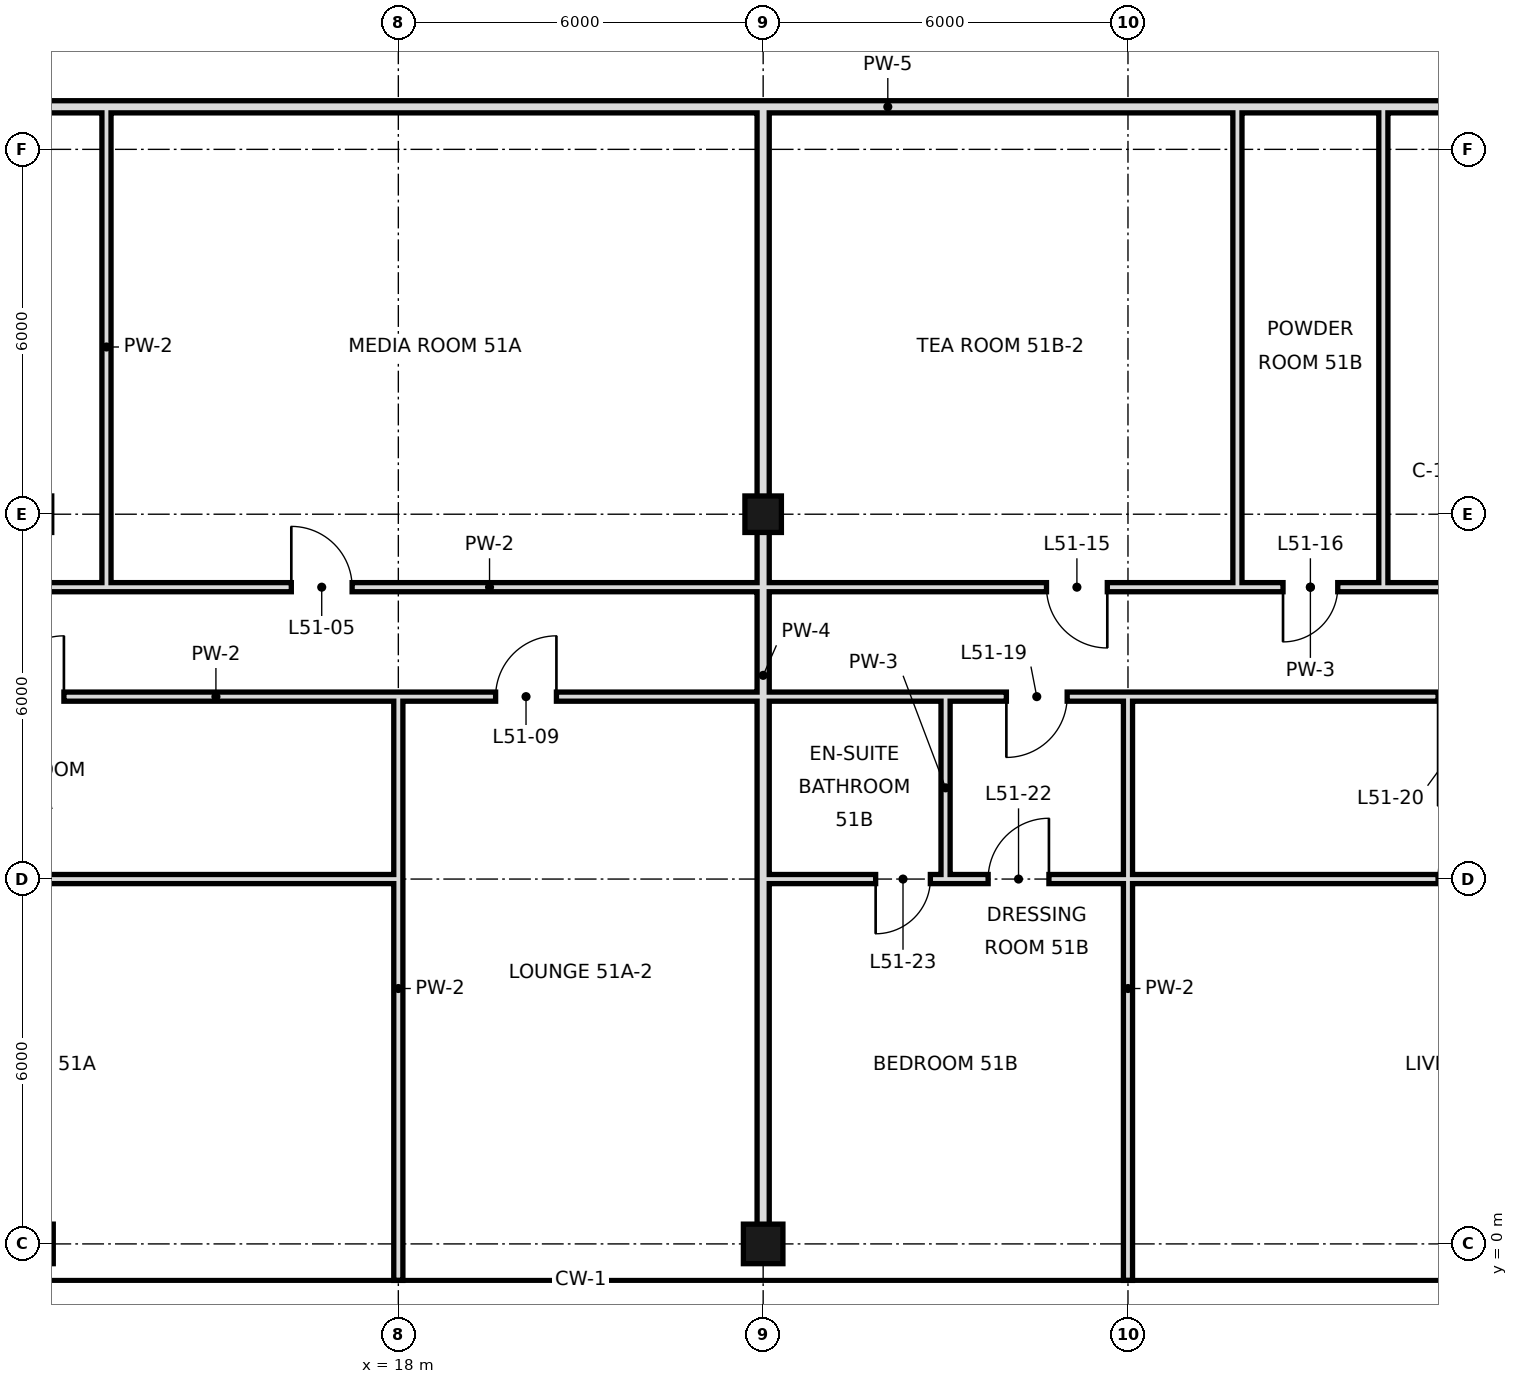
"""IFC4 building model, lengths in metres.
Left out: names, types, materials, properties, quantities, classifications, styles, units other than length and angle.
Written with IfcOpenShell. Run it as: python <this file> out.ifc"""

import sys

from ifc_helpers import new_model, si_unit, direction, frame, frame_2d, origin, origin_2d, place, context, subcontext, project, spatial, rectangle, hollow_rectangle, extrude, element, fill, save


model = new_model("IFC4")
c1 = context("Model", 3, precision=1e-05, world=origin(), true_north=direction((0.0, 1.0)))
c2 = subcontext(c1, "Body", "Model", "MODEL_VIEW")
j1 = project(units=[si_unit("LENGTHUNIT", "METRE"), si_unit("PLANEANGLEUNIT", "RADIAN")], contexts=[c1])
p1 = place(None, origin())
s1 = spatial("IfcSite", under=j1, at=p1, CompositionType="ELEMENT")
p2 = place(p1, origin())
s2 = spatial("IfcBuilding", under=s1, at=p2, CompositionType="ELEMENT")
p3 = place(p2, frame((0.0, 0.0, 219.0)))
s3 = spatial("IfcBuildingStorey", under=s2, at=p3, CompositionType="ELEMENT", Elevation=219.0)
for number, where, z_axis, x_axis in (
    (1, (12.0, 0.0, 0.0), (0.0, 0.0, 1.0), (1.0, 0.0, 0.0)),
    (2, (24.0, 0.0, 0.0), (0.0, 0.0, 1.0), (1.0, 0.0, 0.0)),
):
    element("IfcColumn", number, at=place(p3, frame(where, z_axis=z_axis, x_axis=x_axis)), inside=s3, PredefinedType="COLUMN", context=c2, shape_type="SweptSolid", body=[
        extrude(hollow_rectangle(XDim=0.65, YDim=0.65, WallThickness=0.032, at=origin_2d()), origin(), (0.0, 0.0, 1.0), 3.6),
    ])
p4 = place(p3, frame((24.0, 12.0, 0.0), z_axis=(0.0, 0.0, 1.0), x_axis=(1.0, 0.0, 0.0)))
e3 = element("IfcColumn", 3, at=p4, inside=s3, PredefinedType="COLUMN", context=c2, shape_type="SweptSolid", body=[
    extrude(hollow_rectangle(XDim=0.6, YDim=0.6, WallThickness=0.028, at=origin_2d()), origin(), (0.0, 0.0, 1.0), 3.6),
])
p5 = place(p3, frame((13.2, 10.8, 0.0), z_axis=(0.0, 0.0, 1.0), x_axis=(0.0, 1.0, 0.0)))
e4 = element("IfcWall", 4, at=p5, inside=s3, PredefinedType="PARTITIONING", context=c2, shape_type="SweptSolid", body=[
    extrude(rectangle(XDim=7.9, YDim=0.15, at=frame_2d((3.95, 0.0))), origin(), (0.0, 0.0, 1.0), 3.42),
])
p6 = place(p3, frame((18.0, -0.6, 0.0), z_axis=(0.0, 0.0, 1.0), x_axis=(0.0, 1.0, 0.0)))
e5 = element("IfcWall", 5, at=p6, inside=s3, PredefinedType="PARTITIONING", context=c2, shape_type="SweptSolid", body=[
    extrude(rectangle(XDim=9.6, YDim=0.15, at=frame_2d((4.8, 0.0))), origin(), (0.0, 0.0, 1.0), 2.72),
])
p7 = place(p3, frame((24.0, 0.0, 0.0), z_axis=(0.0, 0.0, 1.0), x_axis=(0.0, 1.0, 0.0)))
e6 = element("IfcWall", 6, at=p7, inside=s3, PredefinedType="SOLIDWALL", context=c2, shape_type="SweptSolid", body=[
    extrude(rectangle(XDim=18.7, YDim=0.2, at=frame_2d((9.35, 0.0))), origin(), (0.0, 0.0, 1.0), 2.72),
])
p8 = place(p3, frame((27.0, 6.0, 0.0), z_axis=(0.0, 0.0, 1.0), x_axis=(0.0, 1.0, 0.0)))
e7 = element("IfcWall", 7, at=p8, inside=s3, PredefinedType="PARTITIONING", context=c2, shape_type="SweptSolid", body=[
    extrude(rectangle(XDim=3.0, YDim=0.15, at=frame_2d((1.5, 0.0))), origin(), (0.0, 0.0, 1.0), 3.42),
])
p9 = place(p3, frame((30.0, -0.6, 0.0), z_axis=(0.0, 0.0, 1.0), x_axis=(0.0, 1.0, 0.0)))
e8 = element("IfcWall", 8, at=p9, inside=s3, PredefinedType="PARTITIONING", context=c2, shape_type="SweptSolid", body=[
    extrude(rectangle(XDim=9.6, YDim=0.15, at=frame_2d((4.8, 0.0))), origin(), (0.0, 0.0, 1.0), 2.72),
])
for number, where, z_axis, x_axis in (
    (9, (31.8, 10.8, 0.0), (0.0, 0.0, 1.0), (0.0, 1.0, 0.0)),
    (10, (34.2, 10.8, 0.0), (0.0, 0.0, 1.0), (0.0, 1.0, 0.0)),
):
    element("IfcWall", number, at=place(p3, frame(where, z_axis=z_axis, x_axis=x_axis)), inside=s3, PredefinedType="PARTITIONING", context=c2, shape_type="SweptSolid", body=[
        extrude(rectangle(XDim=7.9, YDim=0.15, at=frame_2d((3.95, 0.0))), origin(), (0.0, 0.0, 1.0), 3.42),
    ])
p10 = place(p3, frame((7.2, 10.8, 0.0), z_axis=(0.0, 0.0, 1.0), x_axis=(1.0, 0.0, 0.0)))
e11 = element("IfcWall", 11, at=p10, inside=s3, PredefinedType="PARTITIONING", context=c2, shape_type="SweptSolid", body=[
    extrude(rectangle(XDim=24.6, YDim=0.15, at=frame_2d((12.3, 0.0))), origin(), (0.0, 0.0, 1.0), 3.42),
])
p11 = place(p10, frame((1.6, 0.0, 0.0)))
e12 = element("IfcOpeningElement", 12, at=p11, cuts=e11, PredefinedType="OPENING", context=c2, shape_type="SweptSolid", body=[
    extrude(rectangle(XDim=1.0, YDim=2.4, at=frame_2d((0.5, 1.2))), frame((0.0, 0.085, 0.0), z_axis=(0.0, -1.0, 0.0), x_axis=(1.0, 0.0, 0.0)), (0.0, 0.0, 1.0), 0.17),
])
p12 = place(p10, frame((9.04, 0.0, 0.0)))
e13 = element("IfcOpeningElement", 13, at=p12, cuts=e11, PredefinedType="OPENING", context=c2, shape_type="SweptSolid", body=[
    extrude(rectangle(XDim=1.0, YDim=2.4, at=frame_2d((0.5, 1.2))), frame((0.0, 0.085, 0.0), z_axis=(0.0, -1.0, 0.0), x_axis=(1.0, 0.0, 0.0)), (0.0, 0.0, 1.0), 0.17),
])
p13 = place(p10, frame((21.46, 0.0, 0.0)))
e14 = element("IfcOpeningElement", 14, at=p13, cuts=e11, PredefinedType="OPENING", context=c2, shape_type="SweptSolid", body=[
    extrude(rectangle(XDim=1.0, YDim=2.4, at=frame_2d((0.5, 1.2))), frame((0.0, 0.085, 0.0), z_axis=(0.0, -1.0, 0.0), x_axis=(1.0, 0.0, 0.0)), (0.0, 0.0, 1.0), 0.17),
])
p14 = place(p3, frame((34.2, 10.8, 0.0), z_axis=(0.0, 0.0, 1.0), x_axis=(1.0, 0.0, 0.0)))
e15 = element("IfcWall", 15, at=p14, inside=s3, PredefinedType="PARTITIONING", context=c2, shape_type="SweptSolid", body=[
    extrude(rectangle(XDim=15.6, YDim=0.15, at=frame_2d((7.8, 0.0))), origin(), (0.0, 0.0, 1.0), 3.42),
])
p15 = place(p14, frame((3.4, 0.0, 0.0)))
e16 = element("IfcOpeningElement", 16, at=p15, cuts=e15, PredefinedType="OPENING", context=c2, shape_type="SweptSolid", body=[
    extrude(rectangle(XDim=1.0, YDim=2.4, at=frame_2d((0.5, 1.2))), frame((0.0, 0.085, 0.0), z_axis=(0.0, -1.0, 0.0), x_axis=(1.0, 0.0, 0.0)), (0.0, 0.0, 1.0), 0.17),
])
p16 = place(p14, frame((11.92, 0.0, 0.0)))
e17 = element("IfcOpeningElement", 17, at=p16, cuts=e15, PredefinedType="OPENING", context=c2, shape_type="SweptSolid", body=[
    extrude(rectangle(XDim=1.0, YDim=2.4, at=frame_2d((0.5, 1.2))), frame((0.0, 0.085, 0.0), z_axis=(0.0, -1.0, 0.0), x_axis=(1.0, 0.0, 0.0)), (0.0, 0.0, 1.0), 0.17),
])
p17 = place(p3, frame((31.8, 10.8, 0.0), z_axis=(0.0, 0.0, 1.0), x_axis=(1.0, 0.0, 0.0)))
e18 = element("IfcWall", 18, at=p17, inside=s3, PredefinedType="PARTITIONING", context=c2, shape_type="SweptSolid", body=[
    extrude(rectangle(XDim=2.4, YDim=0.15, at=frame_2d((1.2, 0.0))), origin(), (0.0, 0.0, 1.0), 3.42),
])
p18 = place(p17, frame((0.75, 0.0, 0.0)))
e19 = element("IfcOpeningElement", 19, at=p18, cuts=e18, PredefinedType="OPENING", context=c2, shape_type="SweptSolid", body=[
    extrude(rectangle(XDim=0.9, YDim=2.4, at=frame_2d((0.45, 1.2))), frame((0.0, 0.085, 0.0), z_axis=(0.0, -1.0, 0.0), x_axis=(1.0, 0.0, 0.0)), (0.0, 0.0, 1.0), 0.17),
])
p19 = place(p3, frame((7.2, 18.7, 0.0), z_axis=(0.0, 0.0, 1.0), x_axis=(1.0, 0.0, 0.0)))
e20 = element("IfcWall", 20, at=p19, inside=s3, PredefinedType="SOLIDWALL", context=c2, shape_type="SweptSolid", body=[
    extrude(rectangle(XDim=37.7, YDim=0.2, at=frame_2d((18.85, 0.0))), origin(), (0.0, 0.0, 1.0), 2.72),
])
p20 = place(p19, frame((1.54, 0.0, 0.0)))
e21 = element("IfcOpeningElement", 21, at=p20, cuts=e20, PredefinedType="OPENING", context=c2, shape_type="SweptSolid", body=[
    extrude(rectangle(XDim=1.2, YDim=2.4, at=frame_2d((0.6, 1.2))), frame((0.0, 0.11, 0.0), z_axis=(0.0, -1.0, 0.0), x_axis=(1.0, 0.0, 0.0)), (0.0, 0.0, 1.0), 0.22),
])
p21 = place(p19, frame((30.26, 0.0, 0.0)))
e22 = element("IfcOpeningElement", 22, at=p21, cuts=e20, PredefinedType="OPENING", context=c2, shape_type="SweptSolid", body=[
    extrude(rectangle(XDim=1.2, YDim=2.4, at=frame_2d((0.6, 1.2))), frame((0.0, 0.11, 0.0), z_axis=(0.0, -1.0, 0.0), x_axis=(1.0, 0.0, 0.0)), (0.0, 0.0, 1.0), 0.22),
])
p22 = place(p3, frame((6.0, 6.0, 0.0), z_axis=(0.0, 0.0, 1.0), x_axis=(1.0, 0.0, 0.0)))
e23 = element("IfcWall", 23, at=p22, inside=s3, PredefinedType="PARTITIONING", context=c2, shape_type="SweptSolid", body=[
    extrude(rectangle(XDim=12.0, YDim=0.15, at=frame_2d((6.0, 0.0))), origin(), (0.0, 0.0, 1.0), 2.97),
])
p23 = place(p22, frame((3.4, 0.0, 0.0)))
e24 = element("IfcOpeningElement", 24, at=p23, cuts=e23, PredefinedType="OPENING", context=c2, shape_type="SweptSolid", body=[
    extrude(rectangle(XDim=1.0, YDim=2.4, at=frame_2d((0.5, 1.2))), frame((0.0, 0.085, 0.0), z_axis=(0.0, -1.0, 0.0), x_axis=(1.0, 0.0, 0.0)), (0.0, 0.0, 1.0), 0.17),
])
p24 = place(p3, frame((27.0, 6.0, 0.0), z_axis=(0.0, 0.0, 1.0), x_axis=(1.0, 0.0, 0.0)))
e25 = element("IfcWall", 25, at=p24, inside=s3, PredefinedType="PARTITIONING", context=c2, shape_type="SweptSolid", body=[
    extrude(rectangle(XDim=27.0, YDim=0.15, at=frame_2d((13.5, 0.0))), origin(), (0.0, 0.0, 1.0), 2.97),
])
p25 = place(p24, frame((0.7, 0.0, 0.0)))
e26 = element("IfcOpeningElement", 26, at=p25, cuts=e25, PredefinedType="OPENING", context=c2, shape_type="SweptSolid", body=[
    extrude(rectangle(XDim=1.0, YDim=2.4, at=frame_2d((0.5, 1.2))), frame((0.0, 0.085, 0.0), z_axis=(0.0, -1.0, 0.0), x_axis=(1.0, 0.0, 0.0)), (0.0, 0.0, 1.0), 0.17),
])
p26 = place(p24, frame((8.1, 0.0, 0.0)))
e27 = element("IfcOpeningElement", 27, at=p26, cuts=e25, PredefinedType="OPENING", context=c2, shape_type="SweptSolid", body=[
    extrude(rectangle(XDim=1.8, YDim=2.4, at=frame_2d((0.9, 1.2))), frame((0.0, 0.085, 0.0), z_axis=(0.0, -1.0, 0.0), x_axis=(1.0, 0.0, 0.0)), (0.0, 0.0, 1.0), 0.17),
])
p27 = place(p24, frame((20.5, 0.0, 0.0)))
e28 = element("IfcOpeningElement", 28, at=p27, cuts=e25, PredefinedType="OPENING", context=c2, shape_type="SweptSolid", body=[
    extrude(rectangle(XDim=1.0, YDim=2.4, at=frame_2d((0.5, 1.2))), frame((0.0, 0.085, 0.0), z_axis=(0.0, -1.0, 0.0), x_axis=(1.0, 0.0, 0.0)), (0.0, 0.0, 1.0), 0.17),
])
p28 = place(p3, frame((24.0, 6.0, 0.0), z_axis=(0.0, 0.0, 1.0), x_axis=(1.0, 0.0, 0.0)))
e29 = element("IfcWall", 29, at=p28, inside=s3, PredefinedType="PARTITIONING", context=c2, shape_type="SweptSolid", body=[
    extrude(rectangle(XDim=3.0, YDim=0.15, at=frame_2d((1.5, 0.0))), origin(), (0.0, 0.0, 1.0), 2.97),
])
p29 = place(p28, frame((1.85, 0.0, 0.0)))
e30 = element("IfcOpeningElement", 30, at=p29, cuts=e29, PredefinedType="OPENING", context=c2, shape_type="SweptSolid", body=[
    extrude(rectangle(XDim=0.9, YDim=2.4, at=frame_2d((0.45, 1.2))), frame((0.0, 0.085, 0.0), z_axis=(0.0, -1.0, 0.0), x_axis=(1.0, 0.0, 0.0)), (0.0, 0.0, 1.0), 0.17),
])
p30 = place(p3, frame((6.0, 9.0, 0.0), z_axis=(0.0, 0.0, 1.0), x_axis=(1.0, 0.0, 0.0)))
e31 = element("IfcWall", 31, at=p30, inside=s3, PredefinedType="PARTITIONING", context=c2, shape_type="SweptSolid", body=[
    extrude(rectangle(XDim=18.0, YDim=0.15, at=frame_2d((9.0, 0.0))), origin(), (0.0, 0.0, 1.0), 3.42),
])
p31 = place(p30, frame((5.5, 0.0, 0.0)))
e32 = element("IfcOpeningElement", 32, at=p31, cuts=e31, PredefinedType="OPENING", context=c2, shape_type="SweptSolid", body=[
    extrude(rectangle(XDim=1.0, YDim=2.4, at=frame_2d((0.5, 1.2))), frame((0.0, 0.085, 0.0), z_axis=(0.0, -1.0, 0.0), x_axis=(1.0, 0.0, 0.0)), (0.0, 0.0, 1.0), 0.17),
])
p32 = place(p30, frame((13.6, 0.0, 0.0)))
e33 = element("IfcOpeningElement", 33, at=p32, cuts=e31, PredefinedType="OPENING", context=c2, shape_type="SweptSolid", body=[
    extrude(rectangle(XDim=1.0, YDim=2.4, at=frame_2d((0.5, 1.2))), frame((0.0, 0.085, 0.0), z_axis=(0.0, -1.0, 0.0), x_axis=(1.0, 0.0, 0.0)), (0.0, 0.0, 1.0), 0.17),
])
p33 = place(p3, frame((27.0, 9.0, 0.0), z_axis=(0.0, 0.0, 1.0), x_axis=(1.0, 0.0, 0.0)))
e34 = element("IfcWall", 34, at=p33, inside=s3, PredefinedType="PARTITIONING", context=c2, shape_type="SweptSolid", body=[
    extrude(rectangle(XDim=27.6, YDim=0.15, at=frame_2d((13.8, 0.0))), origin(), (0.0, 0.0, 1.0), 3.42),
])
p34 = place(p33, frame((1.0, 0.0, 0.0)))
e35 = element("IfcOpeningElement", 35, at=p34, cuts=e34, PredefinedType="OPENING", context=c2, shape_type="SweptSolid", body=[
    extrude(rectangle(XDim=1.0, YDim=2.4, at=frame_2d((0.5, 1.2))), frame((0.0, 0.085, 0.0), z_axis=(0.0, -1.0, 0.0), x_axis=(1.0, 0.0, 0.0)), (0.0, 0.0, 1.0), 0.17),
])
p35 = place(p33, frame((8.1, 0.0, 0.0)))
e36 = element("IfcOpeningElement", 36, at=p35, cuts=e34, PredefinedType="OPENING", context=c2, shape_type="SweptSolid", body=[
    extrude(rectangle(XDim=1.8, YDim=2.4, at=frame_2d((0.9, 1.2))), frame((0.0, 0.085, 0.0), z_axis=(0.0, -1.0, 0.0), x_axis=(1.0, 0.0, 0.0)), (0.0, 0.0, 1.0), 0.17),
])
p36 = place(p33, frame((20.5, 0.0, 0.0)))
e37 = element("IfcOpeningElement", 37, at=p36, cuts=e34, PredefinedType="OPENING", context=c2, shape_type="SweptSolid", body=[
    extrude(rectangle(XDim=1.0, YDim=2.4, at=frame_2d((0.5, 1.2))), frame((0.0, 0.085, 0.0), z_axis=(0.0, -1.0, 0.0), x_axis=(1.0, 0.0, 0.0)), (0.0, 0.0, 1.0), 0.17),
])
p37 = place(p3, frame((24.0, 9.0, 0.0), z_axis=(0.0, 0.0, 1.0), x_axis=(1.0, 0.0, 0.0)))
e38 = element("IfcWall", 38, at=p37, inside=s3, PredefinedType="PARTITIONING", context=c2, shape_type="SweptSolid", body=[
    extrude(rectangle(XDim=3.0, YDim=0.15, at=frame_2d((1.5, 0.0))), origin(), (0.0, 0.0, 1.0), 3.42),
])
p38 = place(p12, origin())
e39 = element("IfcDoor", 39, at=p38, inside=s3, OperationType="SINGLE_SWING_LEFT", PredefinedType="DOOR", context=c2, shape_type="SweptSolid", body=[
    extrude(rectangle(XDim=1.0, YDim=2.4, at=frame_2d((0.5, 1.2))), frame((0.0, 0.025, 0.0), z_axis=(0.0, -1.0, 0.0), x_axis=(1.0, 0.0, 0.0)), (0.0, 0.0, 1.0), 0.05),
])
fill(e13, e39)
p39 = place(p31, frame((1.0, 0.0, 0.0), z_axis=(0.0, 0.0, 1.0), x_axis=(-1.0, 0.0, 0.0)))
e40 = element("IfcDoor", 40, at=p39, inside=s3, OperationType="SINGLE_SWING_LEFT", PredefinedType="DOOR", context=c2, shape_type="SweptSolid", body=[
    extrude(rectangle(XDim=1.0, YDim=2.4, at=frame_2d((0.5, 1.2))), frame((0.0, 0.025, 0.0), z_axis=(0.0, -1.0, 0.0), x_axis=(1.0, 0.0, 0.0)), (0.0, 0.0, 1.0), 0.05),
])
fill(e32, e40)
p40 = place(p32, frame((1.0, 0.0, 0.0), z_axis=(0.0, 0.0, 1.0), x_axis=(-1.0, 0.0, 0.0)))
e41 = element("IfcDoor", 41, at=p40, inside=s3, OperationType="SINGLE_SWING_LEFT", PredefinedType="DOOR", context=c2, shape_type="SweptSolid", body=[
    extrude(rectangle(XDim=1.0, YDim=2.4, at=frame_2d((0.5, 1.2))), frame((0.0, 0.025, 0.0), z_axis=(0.0, -1.0, 0.0), x_axis=(1.0, 0.0, 0.0)), (0.0, 0.0, 1.0), 0.05),
])
fill(e33, e41)
p41 = place(p13, origin())
e42 = element("IfcDoor", 42, at=p41, inside=s3, OperationType="SINGLE_SWING_RIGHT", PredefinedType="DOOR", context=c2, shape_type="SweptSolid", body=[
    extrude(rectangle(XDim=1.0, YDim=2.4, at=frame_2d((0.5, 1.2))), frame((0.0, 0.025, 0.0), z_axis=(0.0, -1.0, 0.0), x_axis=(1.0, 0.0, 0.0)), (0.0, 0.0, 1.0), 0.05),
])
fill(e14, e42)
p42 = place(p18, frame((0.9, 0.0, 0.0), z_axis=(0.0, 0.0, 1.0), x_axis=(-1.0, 0.0, 0.0)))
e43 = element("IfcDoor", 43, at=p42, inside=s3, OperationType="SINGLE_SWING_RIGHT", PredefinedType="DOOR", context=c2, shape_type="SweptSolid", body=[
    extrude(rectangle(XDim=0.9, YDim=2.4, at=frame_2d((0.45, 1.2))), frame((0.0, 0.025, 0.0), z_axis=(0.0, -1.0, 0.0), x_axis=(1.0, 0.0, 0.0)), (0.0, 0.0, 1.0), 0.05),
])
fill(e19, e43)
p43 = place(p34, frame((1.0, 0.0, 0.0), z_axis=(0.0, 0.0, 1.0), x_axis=(-1.0, 0.0, 0.0)))
e44 = element("IfcDoor", 44, at=p43, inside=s3, OperationType="SINGLE_SWING_RIGHT", PredefinedType="DOOR", context=c2, shape_type="SweptSolid", body=[
    extrude(rectangle(XDim=1.0, YDim=2.4, at=frame_2d((0.5, 1.2))), frame((0.0, 0.025, 0.0), z_axis=(0.0, -1.0, 0.0), x_axis=(1.0, 0.0, 0.0)), (0.0, 0.0, 1.0), 0.05),
])
fill(e35, e44)
p44 = place(p25, frame((1.0, 0.0, 0.0), z_axis=(0.0, 0.0, 1.0), x_axis=(-1.0, 0.0, 0.0)))
e45 = element("IfcDoor", 45, at=p44, inside=s3, OperationType="SINGLE_SWING_LEFT", PredefinedType="DOOR", context=c2, shape_type="SweptSolid", body=[
    extrude(rectangle(XDim=1.0, YDim=2.4, at=frame_2d((0.5, 1.2))), frame((0.0, 0.025, 0.0), z_axis=(0.0, -1.0, 0.0), x_axis=(1.0, 0.0, 0.0)), (0.0, 0.0, 1.0), 0.05),
])
fill(e26, e45)
p45 = place(p29, frame((0.9, 0.0, 0.0), z_axis=(0.0, 0.0, 1.0), x_axis=(-1.0, 0.0, 0.0)))
e46 = element("IfcDoor", 46, at=p45, inside=s3, OperationType="SINGLE_SWING_RIGHT", PredefinedType="DOOR", context=c2, shape_type="SweptSolid", body=[
    extrude(rectangle(XDim=0.9, YDim=2.4, at=frame_2d((0.45, 1.2))), frame((0.0, 0.025, 0.0), z_axis=(0.0, -1.0, 0.0), x_axis=(1.0, 0.0, 0.0)), (0.0, 0.0, 1.0), 0.05),
])
fill(e30, e46)
save(model, sys.argv[1])
